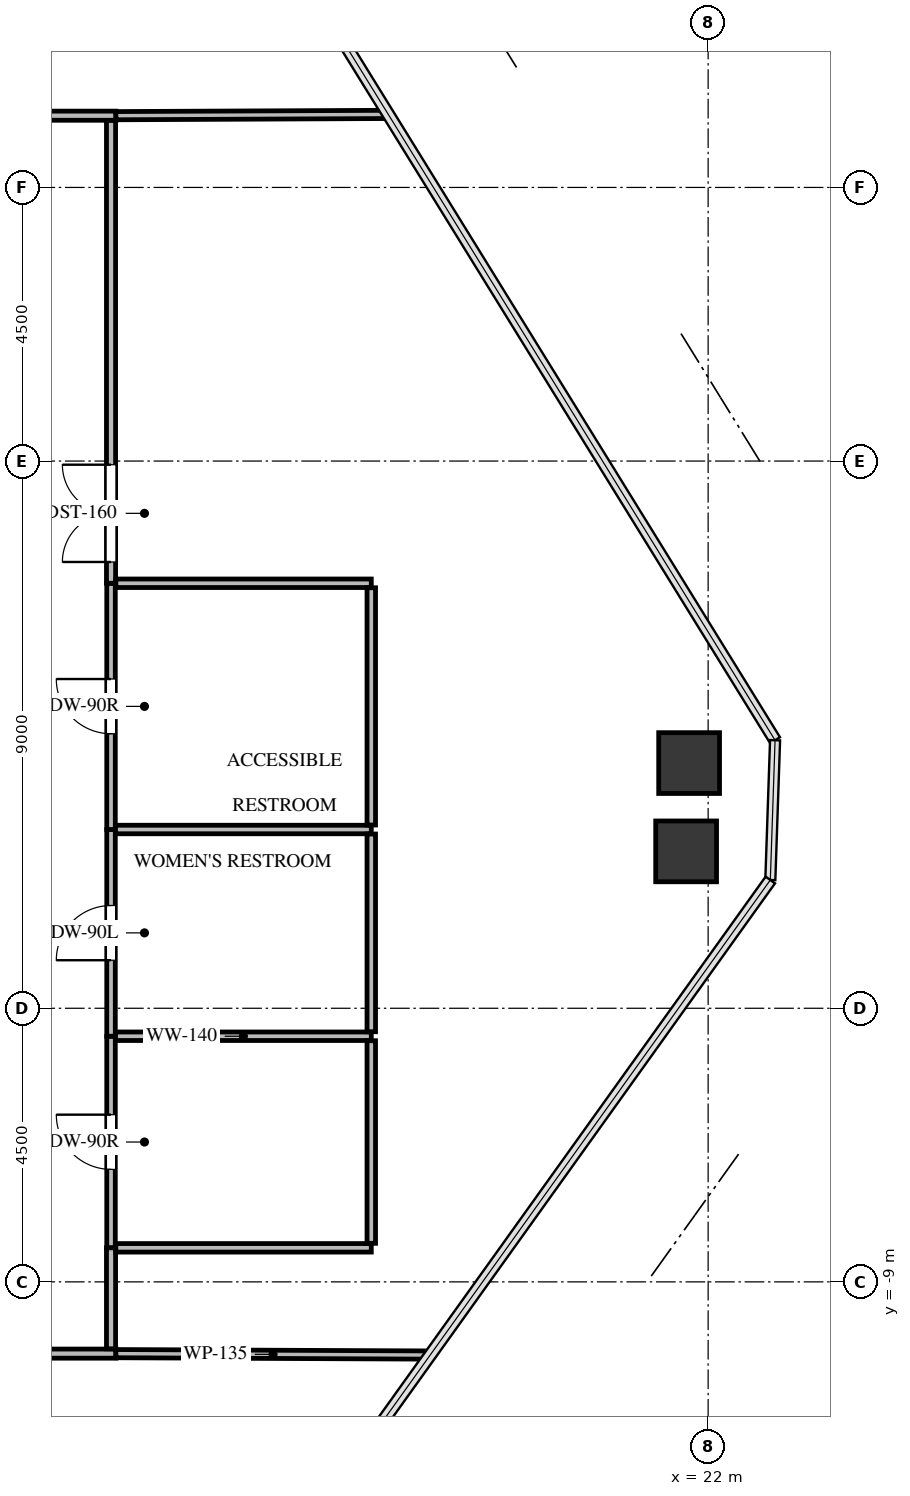
"""IFC4 building model, lengths in metres.
Left out: names, types, materials, properties, quantities, classifications, styles, units other than length and angle.
Written with IfcOpenShell. Run it as: python <this file> out.ifc"""

import sys

from ifc_helpers import new_model, si_unit, direction, frame, frame_2d, origin, origin_2d, place, context, subcontext, project, spatial, rectangle, extrude, source, transform, mapped, element, fill, save


model = new_model("IFC4")
c1 = context("Model", 3, precision=1e-05, world=origin(), true_north=direction((0.0, 1.0)))
c2 = subcontext(c1, "Body", "Model", "MODEL_VIEW")
j1 = project(units=[si_unit("LENGTHUNIT", "METRE"), si_unit("PLANEANGLEUNIT", "RADIAN")], contexts=[c1])
p1 = place(None, origin())
s1 = spatial("IfcSite", under=j1, at=p1, CompositionType="ELEMENT")
p2 = place(p1, origin())
s2 = spatial("IfcBuilding", under=s1, at=p2, CompositionType="ELEMENT")
p3 = place(p2, frame((0.0, 0.0, 167.2)))
s3 = spatial("IfcBuildingStorey", under=s2, at=p3, CompositionType="ELEMENT", Elevation=167.2)
m1 = source(origin(), c2, "Body", "SweptSolid", [
    extrude(rectangle(XDim=1.0, YDim=1.0, at=origin_2d()), origin(), (0.0, 0.0, 1.0), 3.3),
])
for number, where, z_axis, x_axis in (
    (1, (21.687, -0.467, -0.24), (0.0, 0.0, 1.0), (1.0, 0.0, 0.0)),
    (2, (21.638, -1.92, -0.24), (0.0, 0.0, 1.0), (1.0, 0.0, 0.0)),
):
    element("IfcColumn", number, at=place(p3, frame(where, z_axis=z_axis, x_axis=x_axis)), inside=s3, PredefinedType="COLUMN", context=c2, shape_type="MappedRepresentation", body=[
        mapped(m1, transform((0.0, 0.0, 0.0), x_axis=(1.0, 0.0, 0.0), y_axis=(0.0, 1.0, 0.0), z_axis=(0.0, 0.0, 1.0), scale=1.0)),
    ])
p4 = place(p3, frame((12.18, -8.44, 0.0), z_axis=(0.0, 0.0, 1.0), x_axis=(0.0, 1.0, 0.0)))
e3 = element("IfcWall", 3, at=p4, inside=s3, PredefinedType="PARTITIONING", context=c2, shape_type="SweptSolid", body=[
    extrude(rectangle(XDim=3.48, YDim=0.14, at=frame_2d((1.74, 0.0))), origin(), (0.0, 0.0, 1.0), 3.045),
])
p5 = place(p4, frame((1.29, 0.0, 0.0)))
e4 = element("IfcOpeningElement", 4, at=p5, cuts=e3, PredefinedType="OPENING", context=c2, shape_type="SweptSolid", body=[
    extrude(rectangle(XDim=0.9, YDim=2.05, at=frame_2d((0.45, 1.025))), frame((0.0, 0.08, 0.0), z_axis=(0.0, -1.0, 0.0), x_axis=(1.0, 0.0, 0.0)), (0.0, 0.0, 1.0), 0.16),
])
p6 = place(p3, frame((12.18, -4.96, 0.0), z_axis=(0.0, 0.0, 1.0), x_axis=(0.0, 1.0, 0.0)))
e5 = element("IfcWall", 5, at=p6, inside=s3, PredefinedType="PARTITIONING", context=c2, shape_type="SweptSolid", body=[
    extrude(rectangle(XDim=3.4, YDim=0.14, at=frame_2d((1.7, 0.0))), origin(), (0.0, 0.0, 1.0), 3.045),
])
p7 = place(p6, frame((1.25, 0.0, 0.0)))
e6 = element("IfcOpeningElement", 6, at=p7, cuts=e5, PredefinedType="OPENING", context=c2, shape_type="SweptSolid", body=[
    extrude(rectangle(XDim=0.9, YDim=2.05, at=frame_2d((0.45, 1.025))), frame((0.0, 0.08, 0.0), z_axis=(0.0, -1.0, 0.0), x_axis=(1.0, 0.0, 0.0)), (0.0, 0.0, 1.0), 0.16),
])
p8 = place(p3, frame((12.18, -1.56, 0.0), z_axis=(0.0, 0.0, 1.0), x_axis=(0.0, 1.0, 0.0)))
e7 = element("IfcWall", 7, at=p8, inside=s3, PredefinedType="PARTITIONING", context=c2, shape_type="SweptSolid", body=[
    extrude(rectangle(XDim=4.05, YDim=0.14, at=frame_2d((2.025, 0.0))), origin(), (0.0, 0.0, 1.0), 2.242),
])
p9 = place(p8, frame((1.575, 0.0, 0.0)))
e8 = element("IfcOpeningElement", 8, at=p9, cuts=e7, PredefinedType="OPENING", context=c2, shape_type="SweptSolid", body=[
    extrude(rectangle(XDim=0.9, YDim=2.05, at=frame_2d((0.45, 1.025))), frame((0.0, 0.08, 0.0), z_axis=(0.0, -1.0, 0.0), x_axis=(1.0, 0.0, 0.0)), (0.0, 0.0, 1.0), 0.16),
])
p10 = place(p3, frame((12.26, 10.18, 0.0), z_axis=(0.0, 0.0, 1.0), x_axis=(-1.0, 0.0, 0.0)))
e9 = element("IfcWall", 9, at=p10, inside=s3, PredefinedType="PARTITIONING", context=c2, shape_type="SweptSolid", body=[
    extrude(rectangle(XDim=11.25, YDim=0.15, at=frame_2d((5.625, 0.0))), origin(), (0.0, 0.0, 1.0), 2.242),
])
p11 = place(p10, frame((4.825, 0.0, 0.0)))
e10 = element("IfcOpeningElement", 10, at=p11, cuts=e9, PredefinedType="OPENING", context=c2, shape_type="SweptSolid", body=[
    extrude(rectangle(XDim=1.6, YDim=2.15, at=frame_2d((0.8, 1.075))), frame((0.0, 0.085, 0.0), z_axis=(0.0, -1.0, 0.0), x_axis=(1.0, 0.0, 0.0)), (0.0, 0.0, 1.0), 0.17),
])
p12 = place(p3, frame((1.01, -10.18, 0.0), z_axis=(0.0, 0.0, 1.0), x_axis=(1.0, 0.0, 0.0)))
e11 = element("IfcWall", 11, at=p12, inside=s3, PredefinedType="PARTITIONING", context=c2, shape_type="SweptSolid", body=[
    extrude(rectangle(XDim=11.25, YDim=0.15, at=frame_2d((5.625, 0.0))), origin(), (0.0, 0.0, 1.0), 2.242),
])
p13 = place(p12, frame((5.15, 0.0, 0.0)))
e12 = element("IfcOpeningElement", 12, at=p13, cuts=e11, PredefinedType="OPENING", context=c2, shape_type="SweptSolid", body=[
    extrude(rectangle(XDim=0.95, YDim=2.1, at=frame_2d((0.475, 1.05))), frame((0.0, 0.085, 0.0), z_axis=(0.0, -1.0, 0.0), x_axis=(1.0, 0.0, 0.0)), (0.0, 0.0, 1.0), 0.17),
])
p14 = place(p3, frame((12.18, 2.49, 0.0), z_axis=(0.0, 0.0, 1.0), x_axis=(0.0, 1.0, 0.0)))
e13 = element("IfcWall", 13, at=p14, inside=s3, PredefinedType="PARTITIONING", context=c2, shape_type="SweptSolid", body=[
    extrude(rectangle(XDim=7.611, YDim=0.15, at=frame_2d((3.806, 0.0))), origin(), (0.0, 0.0, 1.0), 3.045),
])
p15 = place(p14, frame((0.35, 0.0, 0.0)))
e14 = element("IfcOpeningElement", 14, at=p15, cuts=e13, PredefinedType="OPENING", context=c2, shape_type="SweptSolid", body=[
    extrude(rectangle(XDim=1.6, YDim=2.15, at=frame_2d((0.8, 1.075))), frame((0.0, 0.085, 0.0), z_axis=(0.0, -1.0, 0.0), x_axis=(1.0, 0.0, 0.0)), (0.0, 0.0, 1.0), 0.17),
])
p16 = place(p3, frame((12.18, -10.101, 0.0), z_axis=(0.0, 0.0, 1.0), x_axis=(0.0, 1.0, 0.0)))
e15 = element("IfcWall", 15, at=p16, inside=s3, PredefinedType="PARTITIONING", context=c2, shape_type="SweptSolid", body=[
    extrude(rectangle(XDim=1.661, YDim=0.15, at=frame_2d((0.831, 0.0))), origin(), (0.0, 0.0, 1.0), 3.045),
])
p17 = place(p3, frame((12.254, -4.96, 0.0), z_axis=(0.0, 0.0, 1.0), x_axis=(1.0, 0.0, 0.0)))
e16 = element("IfcWall", 16, at=p17, inside=s3, PredefinedType="PARTITIONING", context=c2, shape_type="SweptSolid", body=[
    extrude(rectangle(XDim=4.206, YDim=0.14, at=frame_2d((2.103, 0.0))), origin(), (0.0, 0.0, 1.0), 3.045),
])
p18 = place(p3, frame((16.46, -8.44, 0.0), z_axis=(0.0, 0.0, 1.0), x_axis=(-1.0, 0.0, 0.0)))
e17 = element("IfcWall", 17, at=p18, inside=s3, PredefinedType="PARTITIONING", context=c2, shape_type="SweptSolid", body=[
    extrude(rectangle(XDim=4.201, YDim=0.14, at=frame_2d((2.101, 0.0))), origin(), (0.0, 0.0, 1.0), 3.045),
])
p19 = place(p3, frame((16.46, -5.034, 0.0), z_axis=(0.0, 0.0, 1.0), x_axis=(0.0, -1.0, 0.0)))
e18 = element("IfcWall", 18, at=p19, inside=s3, PredefinedType="PARTITIONING", context=c2, shape_type="SweptSolid", body=[
    extrude(rectangle(XDim=3.332, YDim=0.14, at=frame_2d((1.666, 0.0))), origin(), (0.0, 0.0, 1.0), 3.045),
])
p20 = place(p3, frame((12.254, -1.56, 0.0), z_axis=(0.0, 0.0, 1.0), x_axis=(1.0, 0.0, 0.0)))
e19 = element("IfcWall", 19, at=p20, inside=s3, PredefinedType="PARTITIONING", context=c2, shape_type="SweptSolid", body=[
    extrude(rectangle(XDim=4.206, YDim=0.14, at=frame_2d((2.103, 0.0))), origin(), (0.0, 0.0, 1.0), 3.045),
])
p21 = place(p3, frame((16.46, -1.634, 0.0), z_axis=(0.0, 0.0, 1.0), x_axis=(0.0, -1.0, 0.0)))
e20 = element("IfcWall", 20, at=p21, inside=s3, PredefinedType="PARTITIONING", context=c2, shape_type="SweptSolid", body=[
    extrude(rectangle(XDim=3.252, YDim=0.14, at=frame_2d((1.626, 0.0))), origin(), (0.0, 0.0, 1.0), 3.045),
])
p22 = place(p3, frame((12.259, 2.49, 0.0), z_axis=(0.0, 0.0, 1.0), x_axis=(1.0, 0.0, 0.0)))
e21 = element("IfcWall", 21, at=p22, inside=s3, PredefinedType="PARTITIONING", context=c2, shape_type="SweptSolid", body=[
    extrude(rectangle(XDim=4.201, YDim=0.14, at=frame_2d((2.101, 0.0))), origin(), (0.0, 0.0, 1.0), 3.045),
])
p23 = place(p3, frame((16.46, 2.416, 0.0), z_axis=(0.0, 0.0, 1.0), x_axis=(0.0, -1.0, 0.0)))
e22 = element("IfcWall", 22, at=p23, inside=s3, PredefinedType="PARTITIONING", context=c2, shape_type="SweptSolid", body=[
    extrude(rectangle(XDim=3.902, YDim=0.14, at=frame_2d((1.951, 0.0))), origin(), (0.0, 0.0, 1.0), 2.242),
])
p24 = place(p3, frame((16.74, 10.201, 0.0), z_axis=(0.0, 0.0, 1.0), x_axis=(-0.999989522694, -0.004577608714, 0.0)))
e23 = element("IfcWall", 23, at=p24, inside=s3, PredefinedType="PARTITIONING", context=c2, shape_type="SweptSolid", body=[
    extrude(rectangle(XDim=4.48, YDim=0.135, at=frame_2d((2.24, 0.0))), origin(), (0.0, 0.0, 1.0), 2.399),
])
p25 = place(p3, frame((12.26, -10.18, 0.0), z_axis=(0.0, 0.0, 1.0), x_axis=(0.999990144117, -0.004439782427, 0.0)))
e24 = element("IfcWall", 24, at=p25, inside=s3, PredefinedType="PARTITIONING", context=c2, shape_type="SweptSolid", body=[
    extrude(rectangle(XDim=5.169, YDim=0.135, at=frame_2d((2.584, 0.0))), origin(), (0.0, 0.0, 1.0), 2.399),
])
m2 = source(origin(), c2, "Body", "SweptSolid", [
    extrude(rectangle(XDim=0.9, YDim=2.05, at=frame_2d((0.45, 1.025))), frame((0.0, 0.025, 0.0), z_axis=(0.0, -1.0, 0.0), x_axis=(1.0, 0.0, 0.0)), (0.0, 0.0, 1.0), 0.05),
])
p26 = place(p5, origin())
e25 = element("IfcDoor", 25, at=p26, inside=s3, OperationType="SINGLE_SWING_RIGHT", PredefinedType="DOOR", context=c2, shape_type="MappedRepresentation", body=[
    mapped(m2, transform((0.0, 0.0, 0.0), x_axis=(1.0, 0.0, 0.0), y_axis=(0.0, 1.0, 0.0), z_axis=(0.0, 0.0, 1.0), scale=1.0)),
])
fill(e4, e25)
m3 = source(origin(), c2, "Body", "SweptSolid", [
    extrude(rectangle(XDim=0.9, YDim=2.05, at=frame_2d((0.45, 1.025))), frame((0.0, 0.025, 0.0), z_axis=(0.0, -1.0, 0.0), x_axis=(1.0, 0.0, 0.0)), (0.0, 0.0, 1.0), 0.05),
])
p27 = place(p7, origin())
e26 = element("IfcDoor", 26, at=p27, inside=s3, OperationType="SINGLE_SWING_LEFT", PredefinedType="DOOR", context=c2, shape_type="MappedRepresentation", body=[
    mapped(m3, transform((0.0, 0.0, 0.0), x_axis=(1.0, 0.0, 0.0), y_axis=(0.0, 1.0, 0.0), z_axis=(0.0, 0.0, 1.0), scale=1.0)),
])
fill(e6, e26)
p28 = place(p9, origin())
e27 = element("IfcDoor", 27, at=p28, inside=s3, OperationType="SINGLE_SWING_RIGHT", PredefinedType="DOOR", context=c2, shape_type="MappedRepresentation", body=[
    mapped(m2, transform((0.0, 0.0, 0.0), x_axis=(1.0, 0.0, 0.0), y_axis=(0.0, 1.0, 0.0), z_axis=(0.0, 0.0, 1.0), scale=1.0)),
])
fill(e8, e27)
m4 = source(origin(), c2, "Body", "SweptSolid", [
    extrude(rectangle(XDim=1.6, YDim=2.15, at=frame_2d((0.8, 1.075))), frame((0.0, 0.025, 0.0), z_axis=(0.0, -1.0, 0.0), x_axis=(1.0, 0.0, 0.0)), (0.0, 0.0, 1.0), 0.05),
])
p29 = place(p15, origin())
e28 = element("IfcDoor", 28, at=p29, inside=s3, OperationType="DOUBLE_DOOR_SINGLE_SWING", PredefinedType="DOOR", context=c2, shape_type="MappedRepresentation", body=[
    mapped(m4, transform((0.0, 0.0, 0.0), x_axis=(1.0, 0.0, 0.0), y_axis=(0.0, 1.0, 0.0), z_axis=(0.0, 0.0, 1.0), scale=1.0)),
])
fill(e14, e28)
save(model, sys.argv[1])
